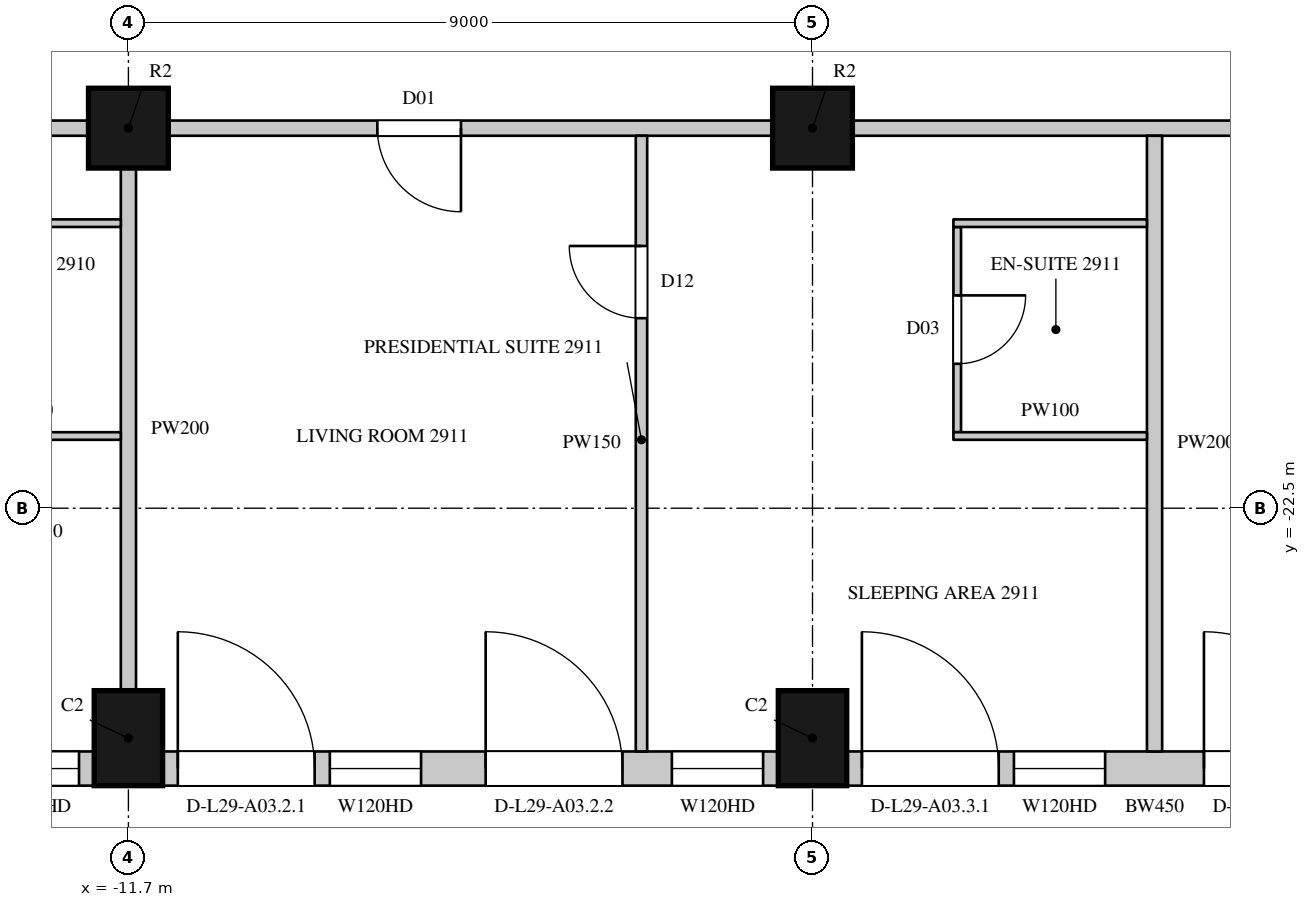
"""IFC4 building model, lengths in metres.
Left out: names, types, materials, properties, quantities, classifications, styles, units other than length and angle.
Written with IfcOpenShell. Run it as: python <this file> out.ifc"""

import sys

from ifc_helpers import new_model, si_unit, direction, frame, frame_2d, origin, origin_2d, place, context, subcontext, project, spatial, rectangle, circle, extrude, element, fill, save


model = new_model("IFC4")
c1 = context("Model", 3, precision=1e-05, world=origin(), true_north=direction((0.0, 1.0)))
c2 = subcontext(c1, "Body", "Model", "MODEL_VIEW")
j1 = project(units=[si_unit("LENGTHUNIT", "METRE"), si_unit("PLANEANGLEUNIT", "RADIAN")], contexts=[c1])
p1 = place(None, origin())
s1 = spatial("IfcSite", under=j1, at=p1, CompositionType="ELEMENT")
p2 = place(p1, origin())
s2 = spatial("IfcBuilding", under=s1, at=p2, CompositionType="ELEMENT")
p3 = place(p2, frame((0.0, 0.0, 134.7)))
s3 = spatial("IfcBuildingStorey", under=s2, at=p3, CompositionType="ELEMENT", Elevation=134.7)
for number, where, z_axis, x_axis in (
    (1, (-11.7, -25.525, 0.0), (0.0, 0.0, 1.0), (1.0, 0.0, 0.0)),
    (2, (-2.7, -25.525, 0.0), (0.0, 0.0, 1.0), (1.0, 0.0, 0.0)),
):
    element("IfcColumn", number, at=place(p3, frame(where, z_axis=z_axis, x_axis=x_axis)), inside=s3, PredefinedType="COLUMN", context=c2, shape_type="SweptSolid", body=[
        extrude(rectangle(XDim=0.9, YDim=1.25, at=origin_2d()), origin(), (0.0, 0.0, 1.0), 3.6),
    ])
for number, where, z_axis, x_axis in (
    (3, (-11.7, -17.5, 0.0), (0.0, 0.0, 1.0), (1.0, 0.0, 0.0)),
    (4, (-2.7, -17.5, 0.0), (0.0, 0.0, 1.0), (1.0, 0.0, 0.0)),
):
    element("IfcColumn", number, at=place(p3, frame(where, z_axis=z_axis, x_axis=x_axis)), inside=s3, PredefinedType="COLUMN", context=c2, shape_type="SweptSolid", body=[
        extrude(circle(Radius=0.525, at=origin_2d()), origin(), (0.0, 0.0, 1.0), 3.6),
    ])
p4 = place(p3, frame((-20.25, -25.925, 0.0), z_axis=(0.0, 0.0, 1.0), x_axis=(1.0, 0.0, 0.0)))
e5 = element("IfcWall", 5, at=p4, inside=s3, PredefinedType="SOLIDWALL", context=c2, shape_type="SweptSolid", body=[
    extrude(rectangle(XDim=8.1, YDim=0.45, at=frame_2d((4.05, 0.0))), origin(), (0.0, 0.0, 1.0), 3.3),
])
p5 = place(p4, frame((0.2, 0.0, 0.0)))
e6 = element("IfcOpeningElement", 6, at=p5, cuts=e5, PredefinedType="OPENING", context=c2, shape_type="SweptSolid", body=[
    extrude(rectangle(XDim=1.8, YDim=2.4, at=frame_2d((0.9, 1.2))), frame((0.0, 0.235, 0.0), z_axis=(0.0, -1.0, 0.0), x_axis=(1.0, 0.0, 0.0)), (0.0, 0.0, 1.0), 0.47),
])
p6 = place(p4, frame((2.2, 0.0, 1.05)))
e7 = element("IfcOpeningElement", 7, at=p6, cuts=e5, PredefinedType="OPENING", context=c2, shape_type="SweptSolid", body=[
    extrude(rectangle(XDim=1.2, YDim=2.0, at=frame_2d((0.6, 1.0))), frame((0.0, 0.235, 0.0), z_axis=(0.0, -1.0, 0.0), x_axis=(1.0, 0.0, 0.0)), (0.0, 0.0, 1.0), 0.47),
])
p7 = place(p4, frame((4.7, 0.0, 0.0)))
e8 = element("IfcOpeningElement", 8, at=p7, cuts=e5, PredefinedType="OPENING", context=c2, shape_type="SweptSolid", body=[
    extrude(rectangle(XDim=1.8, YDim=2.4, at=frame_2d((0.9, 1.2))), frame((0.0, 0.235, 0.0), z_axis=(0.0, -1.0, 0.0), x_axis=(1.0, 0.0, 0.0)), (0.0, 0.0, 1.0), 0.47),
])
p8 = place(p4, frame((6.7, 0.0, 1.05)))
e9 = element("IfcOpeningElement", 9, at=p8, cuts=e5, PredefinedType="OPENING", context=c2, shape_type="SweptSolid", body=[
    extrude(rectangle(XDim=1.2, YDim=2.0, at=frame_2d((0.6, 1.0))), frame((0.0, 0.235, 0.0), z_axis=(0.0, -1.0, 0.0), x_axis=(1.0, 0.0, 0.0)), (0.0, 0.0, 1.0), 0.47),
])
p9 = place(p3, frame((-11.25, -25.925, 0.0), z_axis=(0.0, 0.0, 1.0), x_axis=(1.0, 0.0, 0.0)))
e10 = element("IfcWall", 10, at=p9, inside=s3, PredefinedType="SOLIDWALL", context=c2, shape_type="SweptSolid", body=[
    extrude(rectangle(XDim=8.1, YDim=0.45, at=frame_2d((4.05, 0.0))), origin(), (0.0, 0.0, 1.0), 3.3),
])
p10 = place(p9, frame((0.2, 0.0, 0.0)))
e11 = element("IfcOpeningElement", 11, at=p10, cuts=e10, PredefinedType="OPENING", context=c2, shape_type="SweptSolid", body=[
    extrude(rectangle(XDim=1.8, YDim=2.4, at=frame_2d((0.9, 1.2))), frame((0.0, 0.235, 0.0), z_axis=(0.0, -1.0, 0.0), x_axis=(1.0, 0.0, 0.0)), (0.0, 0.0, 1.0), 0.47),
])
p11 = place(p9, frame((2.2, 0.0, 1.05)))
e12 = element("IfcOpeningElement", 12, at=p11, cuts=e10, PredefinedType="OPENING", context=c2, shape_type="SweptSolid", body=[
    extrude(rectangle(XDim=1.2, YDim=2.0, at=frame_2d((0.6, 1.0))), frame((0.0, 0.235, 0.0), z_axis=(0.0, -1.0, 0.0), x_axis=(1.0, 0.0, 0.0)), (0.0, 0.0, 1.0), 0.47),
])
p12 = place(p9, frame((4.25, 0.0, 0.0)))
e13 = element("IfcOpeningElement", 13, at=p12, cuts=e10, PredefinedType="OPENING", context=c2, shape_type="SweptSolid", body=[
    extrude(rectangle(XDim=1.8, YDim=2.4, at=frame_2d((0.9, 1.2))), frame((0.0, 0.235, 0.0), z_axis=(0.0, -1.0, 0.0), x_axis=(1.0, 0.0, 0.0)), (0.0, 0.0, 1.0), 0.47),
])
p13 = place(p9, frame((6.7, 0.0, 1.05)))
e14 = element("IfcOpeningElement", 14, at=p13, cuts=e10, PredefinedType="OPENING", context=c2, shape_type="SweptSolid", body=[
    extrude(rectangle(XDim=1.2, YDim=2.0, at=frame_2d((0.6, 1.0))), frame((0.0, 0.235, 0.0), z_axis=(0.0, -1.0, 0.0), x_axis=(1.0, 0.0, 0.0)), (0.0, 0.0, 1.0), 0.47),
])
p14 = place(p3, frame((-2.25, -25.925, 0.0), z_axis=(0.0, 0.0, 1.0), x_axis=(1.0, 0.0, 0.0)))
e15 = element("IfcWall", 15, at=p14, inside=s3, PredefinedType="SOLIDWALL", context=c2, shape_type="SweptSolid", body=[
    extrude(rectangle(XDim=8.1, YDim=0.45, at=frame_2d((4.05, 0.0))), origin(), (0.0, 0.0, 1.0), 3.3),
])
p15 = place(p14, frame((0.2, 0.0, 0.0)))
e16 = element("IfcOpeningElement", 16, at=p15, cuts=e15, PredefinedType="OPENING", context=c2, shape_type="SweptSolid", body=[
    extrude(rectangle(XDim=1.8, YDim=2.4, at=frame_2d((0.9, 1.2))), frame((0.0, 0.235, 0.0), z_axis=(0.0, -1.0, 0.0), x_axis=(1.0, 0.0, 0.0)), (0.0, 0.0, 1.0), 0.47),
])
p16 = place(p14, frame((2.2, 0.0, 1.05)))
e17 = element("IfcOpeningElement", 17, at=p16, cuts=e15, PredefinedType="OPENING", context=c2, shape_type="SweptSolid", body=[
    extrude(rectangle(XDim=1.2, YDim=2.0, at=frame_2d((0.6, 1.0))), frame((0.0, 0.235, 0.0), z_axis=(0.0, -1.0, 0.0), x_axis=(1.0, 0.0, 0.0)), (0.0, 0.0, 1.0), 0.47),
])
p17 = place(p14, frame((4.7, 0.0, 0.0)))
e18 = element("IfcOpeningElement", 18, at=p17, cuts=e15, PredefinedType="OPENING", context=c2, shape_type="SweptSolid", body=[
    extrude(rectangle(XDim=1.8, YDim=2.4, at=frame_2d((0.9, 1.2))), frame((0.0, 0.235, 0.0), z_axis=(0.0, -1.0, 0.0), x_axis=(1.0, 0.0, 0.0)), (0.0, 0.0, 1.0), 0.47),
])
p18 = place(p14, frame((6.7, 0.0, 1.05)))
e19 = element("IfcOpeningElement", 19, at=p18, cuts=e15, PredefinedType="OPENING", context=c2, shape_type="SweptSolid", body=[
    extrude(rectangle(XDim=1.2, YDim=2.0, at=frame_2d((0.6, 1.0))), frame((0.0, 0.235, 0.0), z_axis=(0.0, -1.0, 0.0), x_axis=(1.0, 0.0, 0.0)), (0.0, 0.0, 1.0), 0.47),
])
p19 = place(p3, frame((-18.8, -17.5, 0.0), z_axis=(0.0, 0.0, 1.0), x_axis=(1.0, 0.0, 0.0)))
e20 = element("IfcWall", 20, at=p19, inside=s3, PredefinedType="PARTITIONING", context=c2, shape_type="SweptSolid", body=[
    extrude(rectangle(XDim=6.575, YDim=0.2, at=frame_2d((3.288, 0.0))), origin(), (0.0, 0.0, 1.0), 2.75),
])
p20 = place(p3, frame((-11.175, -17.5, 0.0), z_axis=(0.0, 0.0, 1.0), x_axis=(1.0, 0.0, 0.0)))
e21 = element("IfcWall", 21, at=p20, inside=s3, PredefinedType="PARTITIONING", context=c2, shape_type="SweptSolid", body=[
    extrude(rectangle(XDim=7.95, YDim=0.2, at=frame_2d((3.975, 0.0))), origin(), (0.0, 0.0, 1.0), 2.75),
])
p21 = place(p20, frame((2.75, 0.0, 0.0)))
e22 = element("IfcOpeningElement", 22, at=p21, cuts=e21, PredefinedType="OPENING", context=c2, shape_type="SweptSolid", body=[
    extrude(rectangle(XDim=1.1, YDim=2.4, at=frame_2d((0.55, 1.2))), frame((0.0, 0.11, 0.0), z_axis=(0.0, -1.0, 0.0), x_axis=(1.0, 0.0, 0.0)), (0.0, 0.0, 1.0), 0.22),
])
p22 = place(p3, frame((-2.175, -17.5, 0.0), z_axis=(0.0, 0.0, 1.0), x_axis=(1.0, 0.0, 0.0)))
e23 = element("IfcWall", 23, at=p22, inside=s3, PredefinedType="PARTITIONING", context=c2, shape_type="SweptSolid", body=[
    extrude(rectangle(XDim=7.95, YDim=0.2, at=frame_2d((3.975, 0.0))), origin(), (0.0, 0.0, 1.0), 2.75),
])
p23 = place(p22, frame((5.2, 0.0, 0.0)))
e24 = element("IfcOpeningElement", 24, at=p23, cuts=e23, PredefinedType="OPENING", context=c2, shape_type="SweptSolid", body=[
    extrude(rectangle(XDim=1.1, YDim=2.4, at=frame_2d((0.55, 1.2))), frame((0.0, 0.11, 0.0), z_axis=(0.0, -1.0, 0.0), x_axis=(1.0, 0.0, 0.0)), (0.0, 0.0, 1.0), 0.22),
])
p24 = place(p3, frame((-4.95, -25.7, 0.0), z_axis=(0.0, 0.0, 1.0), x_axis=(0.0, 1.0, 0.0)))
e25 = element("IfcWall", 25, at=p24, inside=s3, PredefinedType="PARTITIONING", context=c2, shape_type="SweptSolid", body=[
    extrude(rectangle(XDim=8.1, YDim=0.15, at=frame_2d((4.05, 0.0))), origin(), (0.0, 0.0, 1.0), 3.3),
])
p25 = place(p24, frame((5.7, 0.0, 0.0)))
e26 = element("IfcOpeningElement", 26, at=p25, cuts=e25, PredefinedType="OPENING", context=c2, shape_type="SweptSolid", body=[
    extrude(rectangle(XDim=0.95, YDim=2.2, at=frame_2d((0.475, 1.1))), frame((0.0, 0.085, 0.0), z_axis=(0.0, -1.0, 0.0), x_axis=(1.0, 0.0, 0.0)), (0.0, 0.0, 1.0), 0.17),
])
p26 = place(p3, frame((-11.7, -24.9, 0.0), z_axis=(0.0, 0.0, 1.0), x_axis=(0.0, 1.0, 0.0)))
e27 = element("IfcWall", 27, at=p26, inside=s3, PredefinedType="PARTITIONING", context=c2, shape_type="SweptSolid", body=[
    extrude(rectangle(XDim=6.875, YDim=0.2, at=frame_2d((3.438, 0.0))), origin(), (0.0, 0.0, 1.0), 2.75),
])
p27 = place(p3, frame((1.8, -25.7, 0.0), z_axis=(0.0, 0.0, 1.0), x_axis=(0.0, 1.0, 0.0)))
e28 = element("IfcWall", 28, at=p27, inside=s3, PredefinedType="PARTITIONING", context=c2, shape_type="SweptSolid", body=[
    extrude(rectangle(XDim=8.1, YDim=0.2, at=frame_2d((4.05, 0.0))), origin(), (0.0, 0.0, 1.0), 2.65),
])
for number, where, z_axis, x_axis in (
    (29, (-14.346, -21.55, 0.0), (0.0, 0.0, 1.0), (1.0, 0.0, 0.0)),
    (30, (-14.346, -18.75, 0.0), (0.0, 0.0, 1.0), (1.0, 0.0, 0.0)),
):
    element("IfcWall", number, at=place(p3, frame(where, z_axis=z_axis, x_axis=x_axis)), inside=s3, PredefinedType="PARTITIONING", context=c2, shape_type="SweptSolid", body=[
        extrude(rectangle(XDim=2.546, YDim=0.1, at=frame_2d((1.273, 0.0))), origin(), (0.0, 0.0, 1.0), 3.3),
    ])
p28 = place(p3, frame((-0.796, -21.5, 0.0), z_axis=(0.0, 0.0, 1.0), x_axis=(0.0, 1.0, 0.0)))
e31 = element("IfcWall", 31, at=p28, inside=s3, PredefinedType="PARTITIONING", context=c2, shape_type="SweptSolid", body=[
    extrude(rectangle(XDim=2.7, YDim=0.1, at=frame_2d((1.35, 0.0))), origin(), (0.0, 0.0, 1.0), 3.3),
])
p29 = place(p28, frame((0.9, 0.0, 0.0)))
e32 = element("IfcOpeningElement", 32, at=p29, cuts=e31, PredefinedType="OPENING", context=c2, shape_type="SweptSolid", body=[
    extrude(rectangle(XDim=0.9, YDim=2.2, at=frame_2d((0.45, 1.1))), frame((0.0, 0.06, 0.0), z_axis=(0.0, -1.0, 0.0), x_axis=(1.0, 0.0, 0.0)), (0.0, 0.0, 1.0), 0.12),
])
for number, where, z_axis, x_axis in (
    (33, (-0.846, -21.55, 0.0), (0.0, 0.0, 1.0), (1.0, 0.0, 0.0)),
    (34, (-0.846, -18.75, 0.0), (0.0, 0.0, 1.0), (1.0, 0.0, 0.0)),
):
    element("IfcWall", number, at=place(p3, frame(where, z_axis=z_axis, x_axis=x_axis)), inside=s3, PredefinedType="PARTITIONING", context=c2, shape_type="SweptSolid", body=[
        extrude(rectangle(XDim=2.546, YDim=0.1, at=frame_2d((1.273, 0.0))), origin(), (0.0, 0.0, 1.0), 3.3),
    ])
p30 = place(p8, origin())
e35 = element("IfcWindow", 35, at=p30, inside=s3, PartitioningType="SINGLE_PANEL", PredefinedType="WINDOW", context=c2, shape_type="SweptSolid", body=[
    extrude(rectangle(XDim=1.2, YDim=2.0, at=frame_2d((0.6, 1.0))), frame((0.0, 0.135, 0.0), z_axis=(0.0, -1.0, 0.0), x_axis=(1.0, 0.0, 0.0)), (0.0, 0.0, 1.0), 0.06),
])
fill(e9, e35)
p31 = place(p10, origin())
e36 = element("IfcDoor", 36, at=p31, inside=s3, OperationType="SLIDING_TO_LEFT", PredefinedType="DOOR", context=c2, shape_type="SweptSolid", body=[
    extrude(rectangle(XDim=1.8, YDim=2.4, at=frame_2d((0.9, 1.2))), frame((0.0, 0.13, 0.0), z_axis=(0.0, -1.0, 0.0), x_axis=(1.0, 0.0, 0.0)), (0.0, 0.0, 1.0), 0.05),
])
fill(e11, e36)
p32 = place(p11, origin())
e37 = element("IfcWindow", 37, at=p32, inside=s3, PartitioningType="SINGLE_PANEL", PredefinedType="WINDOW", context=c2, shape_type="SweptSolid", body=[
    extrude(rectangle(XDim=1.2, YDim=2.0, at=frame_2d((0.6, 1.0))), frame((0.0, 0.135, 0.0), z_axis=(0.0, -1.0, 0.0), x_axis=(1.0, 0.0, 0.0)), (0.0, 0.0, 1.0), 0.06),
])
fill(e12, e37)
p33 = place(p12, origin())
e38 = element("IfcDoor", 38, at=p33, inside=s3, OperationType="SLIDING_TO_LEFT", PredefinedType="DOOR", context=c2, shape_type="SweptSolid", body=[
    extrude(rectangle(XDim=1.8, YDim=2.4, at=frame_2d((0.9, 1.2))), frame((0.0, 0.13, 0.0), z_axis=(0.0, -1.0, 0.0), x_axis=(1.0, 0.0, 0.0)), (0.0, 0.0, 1.0), 0.05),
])
fill(e13, e38)
p34 = place(p13, origin())
e39 = element("IfcWindow", 39, at=p34, inside=s3, PartitioningType="SINGLE_PANEL", PredefinedType="WINDOW", context=c2, shape_type="SweptSolid", body=[
    extrude(rectangle(XDim=1.2, YDim=2.0, at=frame_2d((0.6, 1.0))), frame((0.0, 0.135, 0.0), z_axis=(0.0, -1.0, 0.0), x_axis=(1.0, 0.0, 0.0)), (0.0, 0.0, 1.0), 0.06),
])
fill(e14, e39)
p35 = place(p15, origin())
e40 = element("IfcDoor", 40, at=p35, inside=s3, OperationType="SLIDING_TO_LEFT", PredefinedType="DOOR", context=c2, shape_type="SweptSolid", body=[
    extrude(rectangle(XDim=1.8, YDim=2.4, at=frame_2d((0.9, 1.2))), frame((0.0, 0.13, 0.0), z_axis=(0.0, -1.0, 0.0), x_axis=(1.0, 0.0, 0.0)), (0.0, 0.0, 1.0), 0.05),
])
fill(e16, e40)
p36 = place(p16, origin())
e41 = element("IfcWindow", 41, at=p36, inside=s3, PartitioningType="SINGLE_PANEL", PredefinedType="WINDOW", context=c2, shape_type="SweptSolid", body=[
    extrude(rectangle(XDim=1.2, YDim=2.0, at=frame_2d((0.6, 1.0))), frame((0.0, 0.135, 0.0), z_axis=(0.0, -1.0, 0.0), x_axis=(1.0, 0.0, 0.0)), (0.0, 0.0, 1.0), 0.06),
])
fill(e17, e41)
p37 = place(p17, origin())
e42 = element("IfcDoor", 42, at=p37, inside=s3, OperationType="SLIDING_TO_LEFT", PredefinedType="DOOR", context=c2, shape_type="SweptSolid", body=[
    extrude(rectangle(XDim=1.8, YDim=2.4, at=frame_2d((0.9, 1.2))), frame((0.0, 0.13, 0.0), z_axis=(0.0, -1.0, 0.0), x_axis=(1.0, 0.0, 0.0)), (0.0, 0.0, 1.0), 0.05),
])
fill(e18, e42)
p38 = place(p21, origin())
e43 = element("IfcDoor", 43, at=p38, inside=s3, OperationType="SINGLE_SWING_LEFT", PredefinedType="DOOR", context=c2, shape_type="SweptSolid", body=[
    extrude(rectangle(XDim=1.1, YDim=2.4, at=frame_2d((0.55, 1.2))), frame((0.0, 0.025, 0.0), z_axis=(0.0, -1.0, 0.0), x_axis=(1.0, 0.0, 0.0)), (0.0, 0.0, 1.0), 0.05),
])
fill(e22, e43)
p39 = place(p25, origin())
e44 = element("IfcDoor", 44, at=p39, inside=s3, OperationType="SINGLE_SWING_RIGHT", PredefinedType="DOOR", context=c2, shape_type="SweptSolid", body=[
    extrude(rectangle(XDim=0.95, YDim=2.2, at=frame_2d((0.475, 1.1))), frame((0.0, 0.025, 0.0), z_axis=(0.0, -1.0, 0.0), x_axis=(1.0, 0.0, 0.0)), (0.0, 0.0, 1.0), 0.05),
])
fill(e26, e44)
p40 = place(p29, origin())
e45 = element("IfcDoor", 45, at=p40, inside=s3, OperationType="SINGLE_SWING_LEFT", PredefinedType="DOOR", context=c2, shape_type="SweptSolid", body=[
    extrude(rectangle(XDim=0.9, YDim=2.2, at=frame_2d((0.45, 1.1))), frame((0.0, 0.025, 0.0), z_axis=(0.0, -1.0, 0.0), x_axis=(1.0, 0.0, 0.0)), (0.0, 0.0, 1.0), 0.05),
])
fill(e32, e45)
save(model, sys.argv[1])
